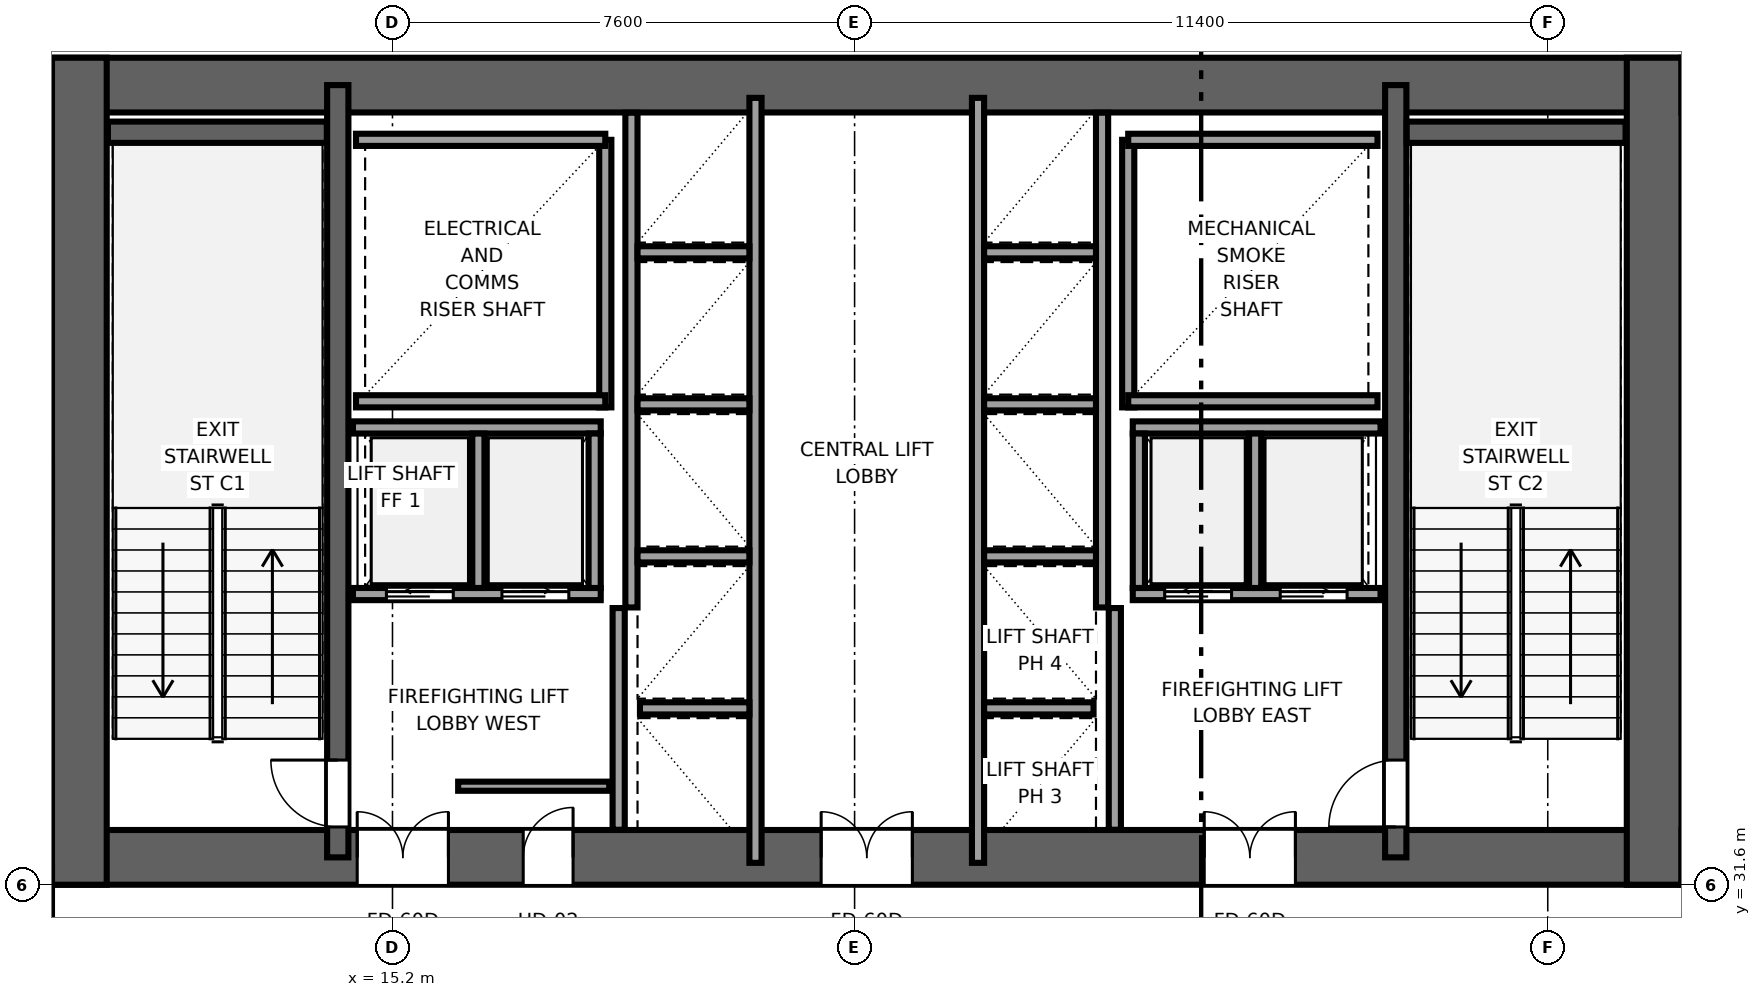
"""IFC4 building model, lengths in metres.
Left out: names, types, materials, properties, quantities, classifications, styles, units other than length and angle.
Written with IfcOpenShell. Run it as: python <this file> out.ifc"""

import sys

from ifc_helpers import new_model, si_unit, direction, frame, frame_2d, origin, place, context, subcontext, project, spatial, rectangle, extrude, source, transform, mapped, element, fill, save


model = new_model("IFC4")
c1 = context("Model", 3, precision=1e-05, world=origin(), true_north=direction((0.0, 1.0)))
c2 = subcontext(c1, "Body", "Model", "MODEL_VIEW")
j1 = project(units=[si_unit("LENGTHUNIT", "METRE"), si_unit("PLANEANGLEUNIT", "RADIAN")], contexts=[c1])
p1 = place(None, origin())
s1 = spatial("IfcSite", under=j1, at=p1, CompositionType="ELEMENT")
p2 = place(p1, origin())
s2 = spatial("IfcBuilding", under=s1, at=p2, CompositionType="ELEMENT")
p3 = place(p2, frame((0.0, 0.0, 22.4)))
s3 = spatial("IfcBuildingStorey", under=s2, at=p3, CompositionType="ELEMENT", Elevation=22.4)
p4 = place(p3, frame((9.6, 32.05, 0.0), z_axis=(0.0, 0.0, 1.0), x_axis=(1.0, 0.0, 0.0)))
e1 = element("IfcWall", 1, at=p4, inside=s3, PredefinedType="SHEAR", context=c2, shape_type="SweptSolid", body=[
    extrude(rectangle(XDim=26.8, YDim=0.9, at=frame_2d((13.4, 0.0))), origin(), (0.0, 0.0, 1.0), 4.4),
])
p5 = place(p4, frame((6.52, 0.0, 0.0), z_axis=(0.0, 0.0, 1.0), x_axis=(-1.0, 0.0, 0.0)))
e2 = element("IfcOpeningElement", 2, at=p5, cuts=e1, PredefinedType="OPENING", context=c2, shape_type="SweptSolid", body=[
    extrude(rectangle(XDim=1.5, YDim=2.04, at=frame_2d((0.75, 1.02))), frame((0.0, 0.46, 0.0), z_axis=(0.0, -1.0, 0.0), x_axis=(1.0, 0.0, 0.0)), (0.0, 0.0, 1.0), 0.92),
])
p6 = place(p4, frame((14.15, 0.0, 0.0), z_axis=(0.0, 0.0, 1.0), x_axis=(-1.0, 0.0, 0.0)))
e3 = element("IfcOpeningElement", 3, at=p6, cuts=e1, PredefinedType="OPENING", context=c2, shape_type="SweptSolid", body=[
    extrude(rectangle(XDim=1.5, YDim=2.04, at=frame_2d((0.75, 1.02))), frame((0.0, 0.46, 0.0), z_axis=(0.0, -1.0, 0.0), x_axis=(1.0, 0.0, 0.0)), (0.0, 0.0, 1.0), 0.92),
])
p7 = place(p4, frame((20.45, 0.0, 0.0), z_axis=(0.0, 0.0, 1.0), x_axis=(-1.0, 0.0, 0.0)))
e4 = element("IfcOpeningElement", 4, at=p7, cuts=e1, PredefinedType="OPENING", context=c2, shape_type="SweptSolid", body=[
    extrude(rectangle(XDim=1.5, YDim=2.04, at=frame_2d((0.75, 1.02))), frame((0.0, 0.46, 0.0), z_axis=(0.0, -1.0, 0.0), x_axis=(1.0, 0.0, 0.0)), (0.0, 0.0, 1.0), 0.92),
])
p8 = place(p4, frame((8.57, 0.0, 0.0), z_axis=(0.0, 0.0, 1.0), x_axis=(-1.0, 0.0, 0.0)))
e5 = element("IfcOpeningElement", 5, at=p8, cuts=e1, PredefinedType="OPENING", context=c2, shape_type="SweptSolid", body=[
    extrude(rectangle(XDim=0.82, YDim=2.01, at=frame_2d((0.41, 1.005))), frame((0.0, 0.46, 0.0), z_axis=(0.0, -1.0, 0.0), x_axis=(1.0, 0.0, 0.0)), (0.0, 0.0, 1.0), 0.92),
])
p9 = place(p3, frame((9.6, 44.75, 0.0), z_axis=(0.0, 0.0, 1.0), x_axis=(1.0, 0.0, 0.0)))
e6 = element("IfcWall", 6, at=p9, inside=s3, PredefinedType="SHEAR", context=c2, shape_type="SweptSolid", body=[
    extrude(rectangle(XDim=26.8, YDim=0.9, at=frame_2d((13.4, 0.0))), origin(), (0.0, 0.0, 1.0), 4.4),
])
for number, where, z_axis, x_axis in (
    (7, (10.05, 31.6, 0.0), (0.0, 0.0, 1.0), (0.0, 1.0, 0.0)),
    (8, (35.95, 31.6, 0.0), (0.0, 0.0, 1.0), (0.0, 1.0, 0.0)),
):
    element("IfcWall", number, at=place(p3, frame(where, z_axis=z_axis, x_axis=x_axis)), inside=s3, PredefinedType="SHEAR", context=c2, shape_type="SweptSolid", body=[
        extrude(rectangle(XDim=13.6, YDim=0.9, at=frame_2d((6.8, 0.0))), origin(), (0.0, 0.0, 1.0), 4.4),
    ])
p10 = place(p3, frame((14.3, 32.05, 0.0), z_axis=(0.0, 0.0, 1.0), x_axis=(0.0, 1.0, 0.0)))
e9 = element("IfcWall", 9, at=p10, inside=s3, PredefinedType="SHEAR", context=c2, shape_type="SweptSolid", body=[
    extrude(rectangle(XDim=12.7, YDim=0.35, at=frame_2d((6.35, 0.0))), origin(), (0.0, 0.0, 1.0), 4.4),
])
p11 = place(p10, frame((0.5, 0.0, 0.0)))
e10 = element("IfcOpeningElement", 10, at=p11, cuts=e9, PredefinedType="OPENING", context=c2, shape_type="SweptSolid", body=[
    extrude(rectangle(XDim=1.1, YDim=2.12, at=frame_2d((0.55, 1.06))), frame((0.0, 0.185, 0.0), z_axis=(0.0, -1.0, 0.0), x_axis=(1.0, 0.0, 0.0)), (0.0, 0.0, 1.0), 0.37),
])
p12 = place(p3, frame((31.7, 32.05, 0.0), z_axis=(0.0, 0.0, 1.0), x_axis=(0.0, 1.0, 0.0)))
e11 = element("IfcWall", 11, at=p12, inside=s3, PredefinedType="SHEAR", context=c2, shape_type="SweptSolid", body=[
    extrude(rectangle(XDim=12.7, YDim=0.35, at=frame_2d((6.35, 0.0))), origin(), (0.0, 0.0, 1.0), 4.4),
])
p13 = place(p12, frame((1.6, 0.0, 0.0), z_axis=(0.0, 0.0, 1.0), x_axis=(-1.0, 0.0, 0.0)))
e12 = element("IfcOpeningElement", 12, at=p13, cuts=e11, PredefinedType="OPENING", context=c2, shape_type="SweptSolid", body=[
    extrude(rectangle(XDim=1.1, YDim=2.12, at=frame_2d((0.55, 1.06))), frame((0.0, 0.185, 0.0), z_axis=(0.0, -1.0, 0.0), x_axis=(1.0, 0.0, 0.0)), (0.0, 0.0, 1.0), 0.37),
])
for number, where, z_axis, x_axis in (
    (13, (10.52, 43.975, 0.0), (0.0, 0.0, 1.0), (1.0, 0.0, 0.0)),
    (14, (31.88, 43.975, 0.0), (0.0, 0.0, 1.0), (1.0, 0.0, 0.0)),
):
    element("IfcWall", number, at=place(p3, frame(where, z_axis=z_axis, x_axis=x_axis)), inside=s3, PredefinedType="SHEAR", context=c2, shape_type="SweptSolid", body=[
        extrude(rectangle(XDim=3.6, YDim=0.35, at=frame_2d((1.8, 0.0))), origin(), (0.0, 0.0, 1.0), 4.4),
    ])
p14 = place(p3, frame((18.7, 39.45, 0.0), z_axis=(0.0, 0.0, 1.0), x_axis=(0.0, 1.0, 0.0)))
e15 = element("IfcWall", 15, at=p14, inside=s3, PredefinedType="SOLIDWALL", context=c2, shape_type="SweptSolid", body=[
    extrude(rectangle(XDim=4.4, YDim=0.2, at=frame_2d((2.2, 0.0))), origin(), (0.0, 0.0, 1.0), 4.14),
])
for number, where, z_axis, x_axis in (
    (16, (14.6, 39.55, 0.0), (0.0, 0.0, 1.0), (1.0, 0.0, 0.0)),
    (17, (14.6, 43.85, 0.0), (0.0, 0.0, 1.0), (1.0, 0.0, 0.0)),
):
    element("IfcWall", number, at=place(p3, frame(where, z_axis=z_axis, x_axis=x_axis)), inside=s3, PredefinedType="SOLIDWALL", context=c2, shape_type="SweptSolid", body=[
        extrude(rectangle(XDim=4.1, YDim=0.2, at=frame_2d((2.05, 0.0))), origin(), (0.0, 0.0, 1.0), 4.14),
    ])
p15 = place(p3, frame((27.3, 39.45, 0.0), z_axis=(0.0, 0.0, 1.0), x_axis=(0.0, 1.0, 0.0)))
e18 = element("IfcWall", 18, at=p15, inside=s3, PredefinedType="SOLIDWALL", context=c2, shape_type="SweptSolid", body=[
    extrude(rectangle(XDim=4.4, YDim=0.2, at=frame_2d((2.2, 0.0))), origin(), (0.0, 0.0, 1.0), 4.14),
])
for number, where, z_axis, x_axis in (
    (19, (27.3, 39.55, 0.0), (0.0, 0.0, 1.0), (1.0, 0.0, 0.0)),
    (20, (27.3, 43.85, 0.0), (0.0, 0.0, 1.0), (1.0, 0.0, 0.0)),
):
    element("IfcWall", number, at=place(p3, frame(where, z_axis=z_axis, x_axis=x_axis)), inside=s3, PredefinedType="SOLIDWALL", context=c2, shape_type="SweptSolid", body=[
        extrude(rectangle(XDim=4.1, YDim=0.2, at=frame_2d((2.05, 0.0))), origin(), (0.0, 0.0, 1.0), 4.14),
    ])
for number, where, z_axis, x_axis in (
    (21, (18.92, 32.504, 0.0), (0.0, 0.0, 1.0), (0.0, 1.0, 0.0)),
    (22, (27.08, 32.504, 0.0), (0.0, 0.0, 1.0), (0.0, 1.0, 0.0)),
):
    element("IfcWall", number, at=place(p3, frame(where, z_axis=z_axis, x_axis=x_axis)), inside=s3, PredefinedType="SOLIDWALL", context=c2, shape_type="SweptSolid", body=[
        extrude(rectangle(XDim=3.646, YDim=0.2, at=frame_2d((1.823, 0.0))), origin(), (0.0, 0.0, 1.0), 4.14),
    ])
p16 = place(p3, frame((21.17, 31.96, 0.0), z_axis=(0.0, 0.0, 1.0), x_axis=(0.0, 1.0, 0.0)))
e23 = element("IfcWall", 23, at=p16, inside=s3, PredefinedType="SOLIDWALL", context=c2, shape_type="SweptSolid", body=[
    extrude(rectangle(XDim=12.58, YDim=0.2, at=frame_2d((6.29, 0.0))), origin(), (0.0, 0.0, 1.0), 4.14),
])
p17 = place(p3, frame((19.13, 36.16, 0.0), z_axis=(0.0, 0.0, 1.0), x_axis=(0.0, 1.0, 0.0)))
e24 = element("IfcWall", 24, at=p17, inside=s3, PredefinedType="SOLIDWALL", context=c2, shape_type="SweptSolid", body=[
    extrude(rectangle(XDim=8.136, YDim=0.2, at=frame_2d((4.068, 0.0))), origin(), (0.0, 0.0, 1.0), 4.14),
])
p18 = place(p3, frame((19.27, 34.5, 0.0), z_axis=(0.0, 0.0, 1.0), x_axis=(1.0, 0.0, 0.0)))
e25 = element("IfcWall", 25, at=p18, inside=s3, PredefinedType="SOLIDWALL", context=c2, shape_type="SweptSolid", body=[
    extrude(rectangle(XDim=1.8, YDim=0.2, at=frame_2d((0.9, 0.0))), origin(), (0.0, 0.0, 1.0), 4.14),
])
for number, where, z_axis, x_axis in (
    (26, (19.23, 37.0, 0.0), (0.0, 0.0, 1.0), (1.0, 0.0, 0.0)),
    (27, (19.23, 39.5, 0.0), (0.0, 0.0, 1.0), (1.0, 0.0, 0.0)),
    (28, (19.23, 42.0, 0.0), (0.0, 0.0, 1.0), (1.0, 0.0, 0.0)),
):
    element("IfcWall", number, at=place(p3, frame(where, z_axis=z_axis, x_axis=x_axis)), inside=s3, PredefinedType="SOLIDWALL", context=c2, shape_type="SweptSolid", body=[
        extrude(rectangle(XDim=1.84, YDim=0.2, at=frame_2d((0.92, 0.0))), origin(), (0.0, 0.0, 1.0), 4.14),
    ])
p19 = place(p3, frame((27.375, 36.38, 0.0), z_axis=(0.0, 0.0, 1.0), x_axis=(1.0, 0.0, 0.0)))
e29 = element("IfcWall", 29, at=p19, inside=s3, PredefinedType="SOLIDWALL", context=c2, shape_type="SweptSolid", body=[
    extrude(rectangle(XDim=4.075, YDim=0.2, at=frame_2d((2.038, 0.0))), origin(), (0.0, 0.0, 1.0), 4.14),
])
p20 = place(p19, frame((0.525, 0.0, 0.0)))
e30 = element("IfcOpeningElement", 30, at=p20, cuts=e29, PredefinedType="OPENING", context=c2, shape_type="SweptSolid", body=[
    extrude(rectangle(XDim=1.1, YDim=2.12, at=frame_2d((0.55, 1.06))), frame((0.0, 0.11, 0.0), z_axis=(0.0, -1.0, 0.0), x_axis=(1.0, 0.0, 0.0)), (0.0, 0.0, 1.0), 0.22),
])
p21 = place(p19, frame((2.425, 0.0, 0.0)))
e31 = element("IfcOpeningElement", 31, at=p21, cuts=e29, PredefinedType="OPENING", context=c2, shape_type="SweptSolid", body=[
    extrude(rectangle(XDim=1.1, YDim=2.12, at=frame_2d((0.55, 1.06))), frame((0.0, 0.11, 0.0), z_axis=(0.0, -1.0, 0.0), x_axis=(1.0, 0.0, 0.0)), (0.0, 0.0, 1.0), 0.22),
])
p22 = place(p3, frame((27.375, 39.12, 0.0), z_axis=(0.0, 0.0, 1.0), x_axis=(1.0, 0.0, 0.0)))
e32 = element("IfcWall", 32, at=p22, inside=s3, PredefinedType="SOLIDWALL", context=c2, shape_type="SweptSolid", body=[
    extrude(rectangle(XDim=4.075, YDim=0.2, at=frame_2d((2.038, 0.0))), origin(), (0.0, 0.0, 1.0), 4.14),
])
for number, where, z_axis, x_axis in (
    (33, (27.475, 36.48, 0.0), (0.0, 0.0, 1.0), (0.0, 1.0, 0.0)),
    (34, (29.387, 36.48, 0.0), (0.0, 0.0, 1.0), (0.0, 1.0, 0.0)),
):
    element("IfcWall", number, at=place(p3, frame(where, z_axis=z_axis, x_axis=x_axis)), inside=s3, PredefinedType="SOLIDWALL", context=c2, shape_type="SweptSolid", body=[
        extrude(rectangle(XDim=2.54, YDim=0.2, at=frame_2d((1.27, 0.0))), origin(), (0.0, 0.0, 1.0), 4.14),
    ])
p23 = place(p3, frame((14.55, 36.38, 0.0), z_axis=(0.0, 0.0, 1.0), x_axis=(1.0, 0.0, 0.0)))
e35 = element("IfcWall", 35, at=p23, inside=s3, PredefinedType="SOLIDWALL", context=c2, shape_type="SweptSolid", body=[
    extrude(rectangle(XDim=4.075, YDim=0.2, at=frame_2d((2.038, 0.0))), origin(), (0.0, 0.0, 1.0), 4.14),
])
p24 = place(p23, frame((0.55, 0.0, 0.0)))
e36 = element("IfcOpeningElement", 36, at=p24, cuts=e35, PredefinedType="OPENING", context=c2, shape_type="SweptSolid", body=[
    extrude(rectangle(XDim=1.1, YDim=2.12, at=frame_2d((0.55, 1.06))), frame((0.0, 0.11, 0.0), z_axis=(0.0, -1.0, 0.0), x_axis=(1.0, 0.0, 0.0)), (0.0, 0.0, 1.0), 0.22),
])
p25 = place(p23, frame((2.45, 0.0, 0.0)))
e37 = element("IfcOpeningElement", 37, at=p25, cuts=e35, PredefinedType="OPENING", context=c2, shape_type="SweptSolid", body=[
    extrude(rectangle(XDim=1.1, YDim=2.12, at=frame_2d((0.55, 1.06))), frame((0.0, 0.11, 0.0), z_axis=(0.0, -1.0, 0.0), x_axis=(1.0, 0.0, 0.0)), (0.0, 0.0, 1.0), 0.22),
])
p26 = place(p3, frame((14.55, 39.12, 0.0), z_axis=(0.0, 0.0, 1.0), x_axis=(1.0, 0.0, 0.0)))
e38 = element("IfcWall", 38, at=p26, inside=s3, PredefinedType="SOLIDWALL", context=c2, shape_type="SweptSolid", body=[
    extrude(rectangle(XDim=4.075, YDim=0.2, at=frame_2d((2.038, 0.0))), origin(), (0.0, 0.0, 1.0), 4.14),
])
for number, where, z_axis, x_axis in (
    (39, (18.525, 36.48, 0.0), (0.0, 0.0, 1.0), (0.0, 1.0, 0.0)),
    (40, (16.613, 36.48, 0.0), (0.0, 0.0, 1.0), (0.0, 1.0, 0.0)),
):
    element("IfcWall", number, at=place(p3, frame(where, z_axis=z_axis, x_axis=x_axis)), inside=s3, PredefinedType="SOLIDWALL", context=c2, shape_type="SweptSolid", body=[
        extrude(rectangle(XDim=2.54, YDim=0.2, at=frame_2d((1.27, 0.0))), origin(), (0.0, 0.0, 1.0), 4.14),
    ])
p27 = place(p3, frame((24.83, 31.96, 0.0), z_axis=(0.0, 0.0, 1.0), x_axis=(0.0, 1.0, 0.0)))
e41 = element("IfcWall", 41, at=p27, inside=s3, PredefinedType="SOLIDWALL", context=c2, shape_type="SweptSolid", body=[
    extrude(rectangle(XDim=12.58, YDim=0.2, at=frame_2d((6.29, 0.0))), origin(), (0.0, 0.0, 1.0), 4.14),
])
p28 = place(p3, frame((26.87, 36.16, 0.0), z_axis=(0.0, 0.0, 1.0), x_axis=(0.0, 1.0, 0.0)))
e42 = element("IfcWall", 42, at=p28, inside=s3, PredefinedType="SOLIDWALL", context=c2, shape_type="SweptSolid", body=[
    extrude(rectangle(XDim=8.136, YDim=0.2, at=frame_2d((4.068, 0.0))), origin(), (0.0, 0.0, 1.0), 4.14),
])
p29 = place(p3, frame((24.93, 34.5, 0.0), z_axis=(0.0, 0.0, 1.0), x_axis=(1.0, 0.0, 0.0)))
e43 = element("IfcWall", 43, at=p29, inside=s3, PredefinedType="SOLIDWALL", context=c2, shape_type="SweptSolid", body=[
    extrude(rectangle(XDim=1.8, YDim=0.2, at=frame_2d((0.9, 0.0))), origin(), (0.0, 0.0, 1.0), 4.14),
])
for number, where, z_axis, x_axis in (
    (44, (24.93, 37.0, 0.0), (0.0, 0.0, 1.0), (1.0, 0.0, 0.0)),
    (45, (24.93, 39.5, 0.0), (0.0, 0.0, 1.0), (1.0, 0.0, 0.0)),
    (46, (24.93, 42.0, 0.0), (0.0, 0.0, 1.0), (1.0, 0.0, 0.0)),
):
    element("IfcWall", number, at=place(p3, frame(where, z_axis=z_axis, x_axis=x_axis)), inside=s3, PredefinedType="SOLIDWALL", context=c2, shape_type="SweptSolid", body=[
        extrude(rectangle(XDim=1.84, YDim=0.2, at=frame_2d((0.92, 0.0))), origin(), (0.0, 0.0, 1.0), 4.14),
    ])
p30 = place(p3, frame((16.28, 33.22, 0.0), z_axis=(0.0, 0.0, 1.0), x_axis=(1.0, 0.0, 0.0)))
e47 = element("IfcWall", 47, at=p30, inside=s3, PredefinedType="PARTITIONING", context=c2, shape_type="SweptSolid", body=[
    extrude(rectangle(XDim=2.485, YDim=0.15, at=frame_2d((1.242, 0.0))), origin(), (0.0, 0.0, 1.0), 4.14),
])
m1 = source(origin(), c2, "Body", "SweptSolid", [
    extrude(rectangle(XDim=1.1, YDim=2.12, at=frame_2d((0.55, 1.06))), frame((0.0, 0.025, 0.0), z_axis=(0.0, -1.0, 0.0), x_axis=(1.0, 0.0, 0.0)), (0.0, 0.0, 1.0), 0.05),
])
p31 = place(p11, origin())
e48 = element("IfcDoor", 48, at=p31, inside=s3, OperationType="SINGLE_SWING_RIGHT", PredefinedType="DOOR", context=c2, shape_type="MappedRepresentation", body=[
    mapped(m1, transform((0.0, 0.0, 0.0), x_axis=(1.0, 0.0, 0.0), y_axis=(0.0, 1.0, 0.0), z_axis=(0.0, 0.0, 1.0), scale=1.0)),
])
fill(e10, e48)
p32 = place(p13, origin())
e49 = element("IfcDoor", 49, at=p32, inside=s3, OperationType="SINGLE_SWING_LEFT", PredefinedType="DOOR", context=c2, shape_type="MappedRepresentation", body=[
    mapped(m1, transform((0.0, 0.0, 0.0), x_axis=(1.0, 0.0, 0.0), y_axis=(0.0, 1.0, 0.0), z_axis=(0.0, 0.0, 1.0), scale=1.0)),
])
fill(e12, e49)
m2 = source(origin(), c2, "Body", "SweptSolid", [
    extrude(rectangle(XDim=1.5, YDim=2.04, at=frame_2d((0.75, 1.02))), frame((0.0, 0.025, 0.0), z_axis=(0.0, -1.0, 0.0), x_axis=(1.0, 0.0, 0.0)), (0.0, 0.0, 1.0), 0.05),
])
p33 = place(p5, origin())
e50 = element("IfcDoor", 50, at=p33, inside=s3, OperationType="DOUBLE_DOOR_SINGLE_SWING", PredefinedType="DOOR", context=c2, shape_type="MappedRepresentation", body=[
    mapped(m2, transform((0.0, 0.0, 0.0), x_axis=(1.0, 0.0, 0.0), y_axis=(0.0, 1.0, 0.0), z_axis=(0.0, 0.0, 1.0), scale=1.0)),
])
fill(e2, e50)
p34 = place(p6, origin())
e51 = element("IfcDoor", 51, at=p34, inside=s3, OperationType="DOUBLE_DOOR_SINGLE_SWING", PredefinedType="DOOR", context=c2, shape_type="MappedRepresentation", body=[
    mapped(m2, transform((0.0, 0.0, 0.0), x_axis=(1.0, 0.0, 0.0), y_axis=(0.0, 1.0, 0.0), z_axis=(0.0, 0.0, 1.0), scale=1.0)),
])
fill(e3, e51)
p35 = place(p7, origin())
e52 = element("IfcDoor", 52, at=p35, inside=s3, OperationType="DOUBLE_DOOR_SINGLE_SWING", PredefinedType="DOOR", context=c2, shape_type="MappedRepresentation", body=[
    mapped(m2, transform((0.0, 0.0, 0.0), x_axis=(1.0, 0.0, 0.0), y_axis=(0.0, 1.0, 0.0), z_axis=(0.0, 0.0, 1.0), scale=1.0)),
])
fill(e4, e52)
m3 = source(origin(), c2, "Body", "SweptSolid", [
    extrude(rectangle(XDim=0.82, YDim=2.01, at=frame_2d((0.41, 1.005))), frame((0.0, 0.025, 0.0), z_axis=(0.0, -1.0, 0.0), x_axis=(1.0, 0.0, 0.0)), (0.0, 0.0, 1.0), 0.05),
])
p36 = place(p8, origin())
e53 = element("IfcDoor", 53, at=p36, inside=s3, OperationType="SINGLE_SWING_RIGHT", PredefinedType="DOOR", context=c2, shape_type="MappedRepresentation", body=[
    mapped(m3, transform((0.0, 0.0, 0.0), x_axis=(1.0, 0.0, 0.0), y_axis=(0.0, 1.0, 0.0), z_axis=(0.0, 0.0, 1.0), scale=1.0)),
])
fill(e5, e53)
m4 = source(origin(), c2, "Body", "SweptSolid", [
    extrude(rectangle(XDim=1.1, YDim=2.12, at=frame_2d((0.55, 1.06))), frame((0.0, 0.025, 0.0), z_axis=(0.0, -1.0, 0.0), x_axis=(1.0, 0.0, 0.0)), (0.0, 0.0, 1.0), 0.05),
])
p37 = place(p20, origin())
e54 = element("IfcDoor", 54, at=p37, inside=s3, OperationType="SLIDING_TO_LEFT", PredefinedType="DOOR", context=c2, shape_type="MappedRepresentation", body=[
    mapped(m4, transform((0.0, 0.0, 0.0), x_axis=(1.0, 0.0, 0.0), y_axis=(0.0, 1.0, 0.0), z_axis=(0.0, 0.0, 1.0), scale=1.0)),
])
fill(e30, e54)
p38 = place(p21, origin())
e55 = element("IfcDoor", 55, at=p38, inside=s3, OperationType="SLIDING_TO_RIGHT", PredefinedType="DOOR", context=c2, shape_type="MappedRepresentation", body=[
    mapped(m4, transform((0.0, 0.0, 0.0), x_axis=(1.0, 0.0, 0.0), y_axis=(0.0, 1.0, 0.0), z_axis=(0.0, 0.0, 1.0), scale=1.0)),
])
fill(e31, e55)
p39 = place(p24, origin())
e56 = element("IfcDoor", 56, at=p39, inside=s3, OperationType="SLIDING_TO_LEFT", PredefinedType="DOOR", context=c2, shape_type="MappedRepresentation", body=[
    mapped(m4, transform((0.0, 0.0, 0.0), x_axis=(1.0, 0.0, 0.0), y_axis=(0.0, 1.0, 0.0), z_axis=(0.0, 0.0, 1.0), scale=1.0)),
])
fill(e36, e56)
p40 = place(p25, origin())
e57 = element("IfcDoor", 57, at=p40, inside=s3, OperationType="SLIDING_TO_RIGHT", PredefinedType="DOOR", context=c2, shape_type="MappedRepresentation", body=[
    mapped(m4, transform((0.0, 0.0, 0.0), x_axis=(1.0, 0.0, 0.0), y_axis=(0.0, 1.0, 0.0), z_axis=(0.0, 0.0, 1.0), scale=1.0)),
])
fill(e37, e57)
save(model, sys.argv[1])
